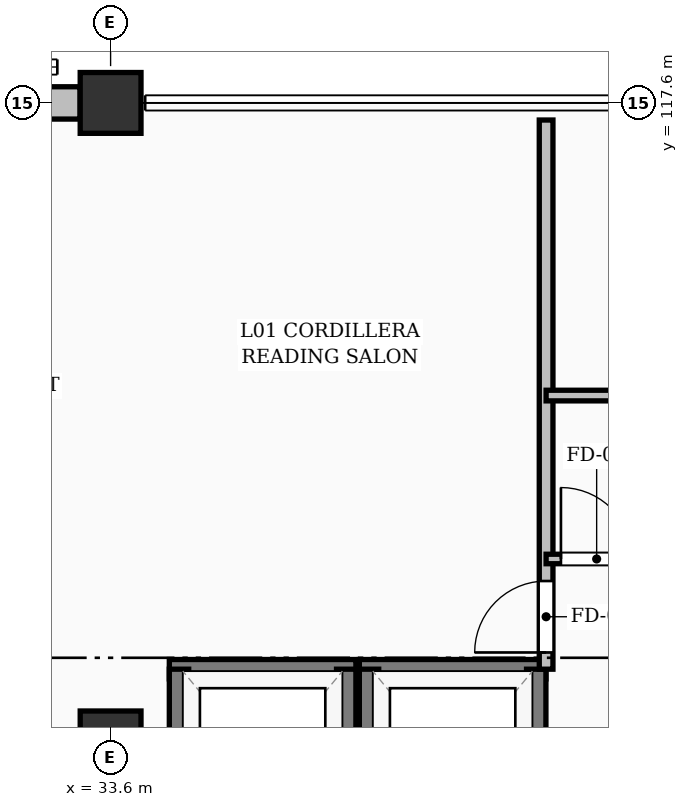
"""IFC4 building model, lengths in metres.
Left out: names, types, materials, properties, quantities, classifications, styles, units other than length and angle.
Written with IfcOpenShell. Run it as: python <this file> out.ifc"""

import sys

from ifc_helpers import new_model, si_unit, direction, frame, frame_2d, origin, origin_2d, place, context, subcontext, project, spatial, rectangle, extrude, element, fill, save


model = new_model("IFC4")
c1 = context("Model", 3, precision=1e-05, world=origin(), true_north=direction((0.0, 1.0)))
c2 = subcontext(c1, "Body", "Model", "MODEL_VIEW")
j1 = project(units=[si_unit("LENGTHUNIT", "METRE"), si_unit("PLANEANGLEUNIT", "RADIAN")], contexts=[c1])
p1 = place(None, origin())
s1 = spatial("IfcSite", under=j1, at=p1, CompositionType="ELEMENT")
p2 = place(p1, origin())
s2 = spatial("IfcBuilding", under=s1, at=p2, CompositionType="ELEMENT")
p3 = place(p2, frame((0.0, 0.0, 3.92)))
s3 = spatial("IfcBuildingStorey", under=s2, at=p3, CompositionType="ELEMENT", Elevation=3.92)
for number, where, z_axis, x_axis in (
    (1, (33.6, 109.2, 0.0), (0.0, 0.0, 1.0), (1.0, 0.0, 0.0)),
    (2, (33.6, 117.6, 0.0), (0.0, 0.0, 1.0), (1.0, 0.0, 0.0)),
):
    element("IfcColumn", number, at=place(p3, frame(where, z_axis=z_axis, x_axis=x_axis)), inside=s3, PredefinedType="COLUMN", context=c2, shape_type="SweptSolid", body=[
        extrude(rectangle(XDim=0.8, YDim=0.8, at=origin_2d()), origin(), (0.0, 0.0, 1.0), 3.64),
    ])
p4 = place(p3, frame((25.601, 117.6, 0.0), z_axis=(0.0, 0.0, 1.0), x_axis=(1.0, 0.0, 0.0)))
e3 = element("IfcWall", 3, at=p4, inside=s3, PredefinedType="SOLIDWALL", context=c2, shape_type="SweptSolid", body=[
    extrude(rectangle(XDim=7.598, YDim=0.425, at=frame_2d((3.799, 0.0))), origin(), (0.0, 0.0, 1.0), 2.445),
])
p5 = place(p4, frame((0.559, 0.0, 0.25)))
e4 = element("IfcOpeningElement", 4, at=p5, cuts=e3, PredefinedType="OPENING", context=c2, shape_type="SweptSolid", body=[
    extrude(rectangle(XDim=2.28, YDim=2.0, at=frame_2d((1.14, 1.0))), frame((0.0, 0.223, 0.0), z_axis=(0.0, -1.0, 0.0), x_axis=(1.0, 0.0, 0.0)), (0.0, 0.0, 1.0), 0.445),
])
p6 = place(p4, frame((4.774, 0.0, 0.25)))
e5 = element("IfcOpeningElement", 5, at=p6, cuts=e3, PredefinedType="OPENING", context=c2, shape_type="SweptSolid", body=[
    extrude(rectangle(XDim=2.25, YDim=1.85, at=frame_2d((1.125, 0.925))), frame((0.0, 0.223, 0.0), z_axis=(0.0, -1.0, 0.0), x_axis=(1.0, 0.0, 0.0)), (0.0, 0.0, 1.0), 0.445),
])
p7 = place(p3, frame((34.373, 110.15, 0.0), z_axis=(0.0, 0.0, 1.0), x_axis=(1.0, 0.0, 0.0)))
e6 = element("IfcWall", 6, at=p7, inside=s3, PredefinedType="SOLIDWALL", context=c2, shape_type="SweptSolid", body=[
    extrude(rectangle(XDim=2.455, YDim=0.255, at=frame_2d((1.228, 0.0))), origin(), (0.0, 0.0, 1.0), 3.36),
])
for number, where, z_axis, x_axis in (
    (7, (34.5, 107.55, 0.0), (0.0, 0.0, 1.0), (0.0, 1.0, 0.0)),
    (8, (36.7, 107.55, 0.0), (0.0, 0.0, 1.0), (0.0, 1.0, 0.0)),
):
    element("IfcWall", number, at=place(p3, frame(where, z_axis=z_axis, x_axis=x_axis)), inside=s3, PredefinedType="SOLIDWALL", context=c2, shape_type="SweptSolid", body=[
        extrude(rectangle(XDim=2.6, YDim=0.255, at=frame_2d((1.3, 0.0))), origin(), (0.0, 0.0, 1.0), 3.36),
    ])
p8 = place(p3, frame((36.873, 110.15, 0.0), z_axis=(0.0, 0.0, 1.0), x_axis=(1.0, 0.0, 0.0)))
e9 = element("IfcWall", 9, at=p8, inside=s3, PredefinedType="SOLIDWALL", context=c2, shape_type="SweptSolid", body=[
    extrude(rectangle(XDim=2.455, YDim=0.255, at=frame_2d((1.228, 0.0))), origin(), (0.0, 0.0, 1.0), 3.36),
])
for number, where, z_axis, x_axis in (
    (10, (37.0, 107.55, 0.0), (0.0, 0.0, 1.0), (0.0, 1.0, 0.0)),
    (11, (39.2, 107.55, 0.0), (0.0, 0.0, 1.0), (0.0, 1.0, 0.0)),
):
    element("IfcWall", number, at=place(p3, frame(where, z_axis=z_axis, x_axis=x_axis)), inside=s3, PredefinedType="SOLIDWALL", context=c2, shape_type="SweptSolid", body=[
        extrude(rectangle(XDim=2.6, YDim=0.255, at=frame_2d((1.3, 0.0))), origin(), (0.0, 0.0, 1.0), 3.36),
    ])
p9 = place(p3, frame((39.33, 110.15, 0.0), z_axis=(0.0, 0.0, 1.0), x_axis=(0.0, 1.0, 0.0)))
e12 = element("IfcWall", 12, at=p9, inside=s3, PredefinedType="PARTITIONING", context=c2, shape_type="SweptSolid", body=[
    extrude(rectangle(XDim=7.225, YDim=0.18, at=frame_2d((3.613, 0.0))), origin(), (0.0, 0.0, 1.0), 3.36),
])
p10 = place(p9, frame((0.22, 0.0, 0.0)))
e13 = element("IfcOpeningElement", 13, at=p10, cuts=e12, PredefinedType="OPENING", context=c2, shape_type="SweptSolid", body=[
    extrude(rectangle(XDim=0.94, YDim=2.1, at=frame_2d((0.47, 1.05))), frame((0.0, 0.1, 0.0), z_axis=(0.0, -1.0, 0.0), x_axis=(1.0, 0.0, 0.0)), (0.0, 0.0, 1.0), 0.2),
])
p11 = place(p3, frame((39.33, 111.6, 0.0), z_axis=(0.0, 0.0, 1.0), x_axis=(1.0, 0.0, 0.0)))
e14 = element("IfcWall", 14, at=p11, inside=s3, PredefinedType="PARTITIONING", context=c2, shape_type="SweptSolid", body=[
    extrude(rectangle(XDim=1.33, YDim=0.125, at=frame_2d((0.665, 0.0))), origin(), (0.0, 0.0, 1.0), 3.36),
])
p12 = place(p11, frame((0.195, 0.0, 0.0)))
e15 = element("IfcOpeningElement", 15, at=p12, cuts=e14, PredefinedType="OPENING", context=c2, shape_type="SweptSolid", body=[
    extrude(rectangle(XDim=0.94, YDim=2.1, at=frame_2d((0.47, 1.05))), frame((0.0, 0.073, 0.0), z_axis=(0.0, -1.0, 0.0), x_axis=(1.0, 0.0, 0.0)), (0.0, 0.0, 1.0), 0.145),
])
p13 = place(p3, frame((39.33, 113.75, 0.0), z_axis=(0.0, 0.0, 1.0), x_axis=(1.0, 0.0, 0.0)))
e16 = element("IfcWall", 16, at=p13, inside=s3, PredefinedType="PARTITIONING", context=c2, shape_type="SweptSolid", body=[
    extrude(rectangle(XDim=2.67, YDim=0.14, at=frame_2d((1.335, 0.0))), origin(), (0.0, 0.0, 1.0), 3.36),
])
p14 = place(p10, origin())
e17 = element("IfcDoor", 17, at=p14, inside=s3, OperationType="SINGLE_SWING_LEFT", PredefinedType="DOOR", context=c2, shape_type="SweptSolid", body=[
    extrude(rectangle(XDim=0.94, YDim=2.1, at=frame_2d((0.47, 1.05))), frame((0.0, 0.025, 0.0), z_axis=(0.0, -1.0, 0.0), x_axis=(1.0, 0.0, 0.0)), (0.0, 0.0, 1.0), 0.05),
])
fill(e13, e17)
p15 = place(p12, origin())
e18 = element("IfcDoor", 18, at=p15, inside=s3, OperationType="SINGLE_SWING_LEFT", PredefinedType="DOOR", context=c2, shape_type="SweptSolid", body=[
    extrude(rectangle(XDim=0.94, YDim=2.1, at=frame_2d((0.47, 1.05))), frame((0.0, 0.025, 0.0), z_axis=(0.0, -1.0, 0.0), x_axis=(1.0, 0.0, 0.0)), (0.0, 0.0, 1.0), 0.05),
])
fill(e15, e18)
save(model, sys.argv[1])
